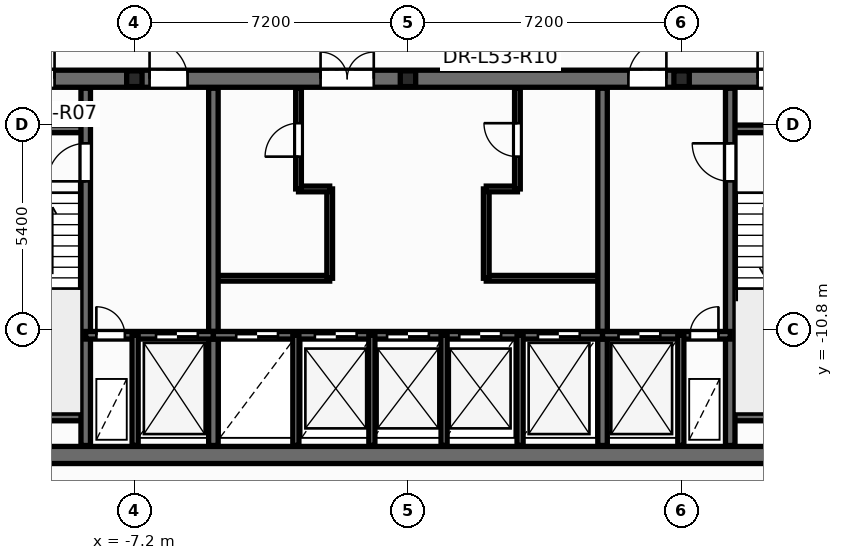
"""IFC4 building model, lengths in metres.
Left out: names, types, materials, properties, quantities, classifications, styles, units other than length and angle.
Written with IfcOpenShell. Run it as: python <this file> out.ifc"""

import sys

from ifc_helpers import new_model, si_unit, direction, frame, frame_2d, origin, origin_2d, place, context, subcontext, project, spatial, rectangle, i_section, extrude, element, fill, save


model = new_model("IFC4")
c1 = context("Model", 3, precision=1e-05, world=origin(), true_north=direction((0.0, 1.0)))
c2 = subcontext(c1, "Body", "Model", "MODEL_VIEW")
j1 = project(units=[si_unit("LENGTHUNIT", "METRE"), si_unit("PLANEANGLEUNIT", "RADIAN")], contexts=[c1])
p1 = place(None, origin())
s1 = spatial("IfcSite", under=j1, at=p1, CompositionType="ELEMENT")
p2 = place(p1, origin())
s2 = spatial("IfcBuilding", under=s1, at=p2, CompositionType="ELEMENT")
p3 = place(p2, frame((0.0, 0.0, 203.7)))
s3 = spatial("IfcBuildingStorey", under=s2, at=p3, CompositionType="ELEMENT", Elevation=203.7)
for number, where, z_axis, x_axis in (
    (1, (-7.2, -4.2, 0.0), (0.0, 0.0, 1.0), (1.0, 0.0, 0.0)),
    (2, (0.0, -4.2, 0.0), (0.0, 0.0, 1.0), (1.0, 0.0, 0.0)),
    (3, (7.2, -4.2, 0.0), (0.0, 0.0, 1.0), (1.0, 0.0, 0.0)),
):
    element("IfcColumn", number, at=place(p3, frame(where, z_axis=z_axis, x_axis=x_axis)), inside=s3, PredefinedType="PILASTER", context=c2, shape_type="SweptSolid", body=[
        extrude(i_section(OverallWidth=0.405, OverallDepth=0.414, WebThickness=0.022, FlangeThickness=0.032, at=origin_2d()), origin(), (0.0, 0.0, 1.0), 3.6),
    ])
p4 = place(p3, frame((-5.12, -9.45, 0.0), z_axis=(0.0, 0.0, 1.0), x_axis=(1.0, 0.0, 0.0)))
e4 = element("IfcWall", 4, at=p4, inside=s3, PredefinedType="PARTITIONING", context=c2, shape_type="SweptSolid", body=[
    extrude(rectangle(XDim=3.06, YDim=0.15, at=frame_2d((1.53, 0.0))), origin(), (0.0, 0.0, 1.0), 3.345),
])
p5 = place(p3, frame((-2.06, -9.45, 0.0), z_axis=(0.0, 0.0, 1.0), x_axis=(0.0, 1.0, 0.0)))
e5 = element("IfcWall", 5, at=p5, inside=s3, PredefinedType="PARTITIONING", context=c2, shape_type="SweptSolid", body=[
    extrude(rectangle(XDim=2.35, YDim=0.15, at=frame_2d((1.175, 0.0))), origin(), (0.0, 0.0, 1.0), 3.345),
])
p6 = place(p3, frame((-2.88, -7.1, 0.0), z_axis=(0.0, 0.0, 1.0), x_axis=(1.0, 0.0, 0.0)))
e6 = element("IfcWall", 6, at=p6, inside=s3, PredefinedType="PARTITIONING", context=c2, shape_type="SweptSolid", body=[
    extrude(rectangle(XDim=0.82, YDim=0.15, at=frame_2d((0.41, 0.0))), origin(), (0.0, 0.0, 1.0), 3.345),
])
p7 = place(p3, frame((-2.88, -7.1, 0.0), z_axis=(0.0, 0.0, 1.0), x_axis=(0.0, 1.0, 0.0)))
e7 = element("IfcWall", 7, at=p7, inside=s3, PredefinedType="PARTITIONING", context=c2, shape_type="SweptSolid", body=[
    extrude(rectangle(XDim=2.65, YDim=0.15, at=frame_2d((1.325, 0.0))), origin(), (0.0, 0.0, 1.0), 3.345),
])
p8 = place(p7, frame((0.85, 0.0, 0.0)))
e8 = element("IfcOpeningElement", 8, at=p8, cuts=e7, PredefinedType="OPENING", context=c2, shape_type="SweptSolid", body=[
    extrude(rectangle(XDim=0.886, YDim=2.104, at=frame_2d((0.44, 1.052))), frame((0.0, 0.085, 0.0), z_axis=(0.0, -1.0, 0.0), x_axis=(1.0, 0.0, 0.0)), (0.0, 0.0, 1.0), 0.17),
])
p9 = place(p3, frame((2.06, -9.45, 0.0), z_axis=(0.0, 0.0, 1.0), x_axis=(1.0, 0.0, 0.0)))
e9 = element("IfcWall", 9, at=p9, inside=s3, PredefinedType="PARTITIONING", context=c2, shape_type="SweptSolid", body=[
    extrude(rectangle(XDim=3.06, YDim=0.15, at=frame_2d((1.53, 0.0))), origin(), (0.0, 0.0, 1.0), 3.345),
])
p10 = place(p3, frame((2.06, -9.45, 0.0), z_axis=(0.0, 0.0, 1.0), x_axis=(0.0, 1.0, 0.0)))
e10 = element("IfcWall", 10, at=p10, inside=s3, PredefinedType="PARTITIONING", context=c2, shape_type="SweptSolid", body=[
    extrude(rectangle(XDim=2.35, YDim=0.15, at=frame_2d((1.175, 0.0))), origin(), (0.0, 0.0, 1.0), 3.345),
])
p11 = place(p3, frame((2.06, -7.1, 0.0), z_axis=(0.0, 0.0, 1.0), x_axis=(1.0, 0.0, 0.0)))
e11 = element("IfcWall", 11, at=p11, inside=s3, PredefinedType="PARTITIONING", context=c2, shape_type="SweptSolid", body=[
    extrude(rectangle(XDim=0.82, YDim=0.15, at=frame_2d((0.41, 0.0))), origin(), (0.0, 0.0, 1.0), 3.345),
])
p12 = place(p3, frame((2.88, -7.1, 0.0), z_axis=(0.0, 0.0, 1.0), x_axis=(0.0, 1.0, 0.0)))
e12 = element("IfcWall", 12, at=p12, inside=s3, PredefinedType="PARTITIONING", context=c2, shape_type="SweptSolid", body=[
    extrude(rectangle(XDim=2.65, YDim=0.15, at=frame_2d((1.325, 0.0))), origin(), (0.0, 0.0, 1.0), 3.345),
])
p13 = place(p12, frame((0.85, 0.0, 0.0)))
e13 = element("IfcOpeningElement", 13, at=p13, cuts=e12, PredefinedType="OPENING", context=c2, shape_type="SweptSolid", body=[
    extrude(rectangle(XDim=0.886, YDim=2.104, at=frame_2d((0.44, 1.052))), frame((0.0, 0.085, 0.0), z_axis=(0.0, -1.0, 0.0), x_axis=(1.0, 0.0, 0.0)), (0.0, 0.0, 1.0), 0.17),
])
p14 = place(p3, frame((-12.65, -14.1, 0.0), z_axis=(0.0, 0.0, 1.0), x_axis=(1.0, 0.0, 0.0)))
e14 = element("IfcWall", 14, at=p14, inside=s3, PredefinedType="SHEAR", context=c2, shape_type="SweptSolid", body=[
    extrude(rectangle(XDim=25.3, YDim=0.45, at=frame_2d((12.65, 0.0))), origin(), (0.0, 0.0, 1.0), 3.6),
])
p15 = place(p3, frame((-12.65, -4.2, 0.0), z_axis=(0.0, 0.0, 1.0), x_axis=(1.0, 0.0, 0.0)))
e15 = element("IfcWall", 15, at=p15, inside=s3, PredefinedType="SHEAR", context=c2, shape_type="SweptSolid", body=[
    extrude(rectangle(XDim=25.3, YDim=0.45, at=frame_2d((12.65, 0.0))), origin(), (0.0, 0.0, 1.0), 3.6),
])
p16 = place(p15, frame((0.95, 0.0, 0.0)))
e16 = element("IfcOpeningElement", 16, at=p16, cuts=e15, PredefinedType="OPENING", context=c2, shape_type="SweptSolid", body=[
    extrude(rectangle(XDim=0.756, YDim=2.054, at=frame_2d((0.375, 1.027))), frame((0.0, 0.235, 0.0), z_axis=(0.0, -1.0, 0.0), x_axis=(1.0, 0.0, 0.0)), (0.0, 0.0, 1.0), 0.47),
])
p17 = place(p15, frame((2.6, 0.0, 0.0)))
e17 = element("IfcOpeningElement", 17, at=p17, cuts=e15, PredefinedType="OPENING", context=c2, shape_type="SweptSolid", body=[
    extrude(rectangle(XDim=0.756, YDim=2.054, at=frame_2d((0.375, 1.027))), frame((0.0, 0.235, 0.0), z_axis=(0.0, -1.0, 0.0), x_axis=(1.0, 0.0, 0.0)), (0.0, 0.0, 1.0), 0.47),
])
p18 = place(p15, frame((21.85, 0.0, 0.0)))
e18 = element("IfcOpeningElement", 18, at=p18, cuts=e15, PredefinedType="OPENING", context=c2, shape_type="SweptSolid", body=[
    extrude(rectangle(XDim=0.756, YDim=2.054, at=frame_2d((0.375, 1.027))), frame((0.0, 0.235, 0.0), z_axis=(0.0, -1.0, 0.0), x_axis=(1.0, 0.0, 0.0)), (0.0, 0.0, 1.0), 0.47),
])
p19 = place(p15, frame((23.5, 0.0, 0.0)))
e19 = element("IfcOpeningElement", 19, at=p19, cuts=e15, PredefinedType="OPENING", context=c2, shape_type="SweptSolid", body=[
    extrude(rectangle(XDim=0.756, YDim=2.054, at=frame_2d((0.375, 1.027))), frame((0.0, 0.235, 0.0), z_axis=(0.0, -1.0, 0.0), x_axis=(1.0, 0.0, 0.0)), (0.0, 0.0, 1.0), 0.47),
])
p20 = place(p15, frame((5.85, 0.0, 0.0)))
e20 = element("IfcOpeningElement", 20, at=p20, cuts=e15, PredefinedType="OPENING", context=c2, shape_type="SweptSolid", body=[
    extrude(rectangle(XDim=1.006, YDim=2.104, at=frame_2d((0.5, 1.052))), frame((0.0, 0.235, 0.0), z_axis=(0.0, -1.0, 0.0), x_axis=(1.0, 0.0, 0.0)), (0.0, 0.0, 1.0), 0.47),
])
p21 = place(p15, frame((10.35, 0.0, 0.0)))
e21 = element("IfcOpeningElement", 21, at=p21, cuts=e15, PredefinedType="OPENING", context=c2, shape_type="SweptSolid", body=[
    extrude(rectangle(XDim=1.406, YDim=2.154, at=frame_2d((0.7, 1.077))), frame((0.0, 0.235, 0.0), z_axis=(0.0, -1.0, 0.0), x_axis=(1.0, 0.0, 0.0)), (0.0, 0.0, 1.0), 0.47),
])
p22 = place(p15, frame((18.45, 0.0, 0.0)))
e22 = element("IfcOpeningElement", 22, at=p22, cuts=e15, PredefinedType="OPENING", context=c2, shape_type="SweptSolid", body=[
    extrude(rectangle(XDim=1.006, YDim=2.104, at=frame_2d((0.5, 1.052))), frame((0.0, 0.235, 0.0), z_axis=(0.0, -1.0, 0.0), x_axis=(1.0, 0.0, 0.0)), (0.0, 0.0, 1.0), 0.47),
])
for number, where, z_axis, x_axis in (
    (23, (-12.35, -5.52, 0.0), (0.0, 0.0, 1.0), (1.0, 0.0, 0.0)),
    (24, (-12.35, -13.1, 0.0), (0.0, 0.0, 1.0), (1.0, 0.0, 0.0)),
    (25, (8.48, -5.52, 0.0), (0.0, 0.0, 1.0), (1.0, 0.0, 0.0)),
    (26, (8.48, -13.1, 0.0), (0.0, 0.0, 1.0), (1.0, 0.0, 0.0)),
):
    element("IfcWall", number, at=place(p3, frame(where, z_axis=z_axis, x_axis=x_axis)), inside=s3, PredefinedType="SOLIDWALL", context=c2, shape_type="SweptSolid", body=[
        extrude(rectangle(XDim=3.87, YDim=0.2, at=frame_2d((1.935, 0.0))), origin(), (0.0, 0.0, 1.0), 3.6),
    ])
p23 = place(p3, frame((-8.48, -13.85, 0.0), z_axis=(0.0, 0.0, 1.0), x_axis=(0.0, 1.0, 0.0)))
e27 = element("IfcWall", 27, at=p23, inside=s3, PredefinedType="SHEAR", context=c2, shape_type="SweptSolid", body=[
    extrude(rectangle(XDim=9.4, YDim=0.25, at=frame_2d((4.7, 0.0))), origin(), (0.0, 0.0, 1.0), 3.6),
])
p24 = place(p23, frame((6.95, 0.0, 0.0)))
e28 = element("IfcOpeningElement", 28, at=p24, cuts=e27, PredefinedType="OPENING", context=c2, shape_type="SweptSolid", body=[
    extrude(rectangle(XDim=1.006, YDim=2.104, at=frame_2d((0.5, 1.052))), frame((0.0, 0.135, 0.0), z_axis=(0.0, -1.0, 0.0), x_axis=(1.0, 0.0, 0.0)), (0.0, 0.0, 1.0), 0.27),
])
p25 = place(p3, frame((8.48, -13.85, 0.0), z_axis=(0.0, 0.0, 1.0), x_axis=(0.0, 1.0, 0.0)))
e29 = element("IfcWall", 29, at=p25, inside=s3, PredefinedType="SHEAR", context=c2, shape_type="SweptSolid", body=[
    extrude(rectangle(XDim=9.4, YDim=0.25, at=frame_2d((4.7, 0.0))), origin(), (0.0, 0.0, 1.0), 3.6),
])
p26 = place(p25, frame((6.95, 0.0, 0.0)))
e30 = element("IfcOpeningElement", 30, at=p26, cuts=e29, PredefinedType="OPENING", context=c2, shape_type="SweptSolid", body=[
    extrude(rectangle(XDim=1.006, YDim=2.104, at=frame_2d((0.5, 1.052))), frame((0.0, 0.135, 0.0), z_axis=(0.0, -1.0, 0.0), x_axis=(1.0, 0.0, 0.0)), (0.0, 0.0, 1.0), 0.27),
])
for number, where, z_axis, x_axis in (
    (31, (-5.12, -13.85, 0.0), (0.0, 0.0, 1.0), (0.0, 1.0, 0.0)),
    (32, (5.12, -13.85, 0.0), (0.0, 0.0, 1.0), (0.0, 1.0, 0.0)),
):
    element("IfcWall", number, at=place(p3, frame(where, z_axis=z_axis, x_axis=x_axis)), inside=s3, PredefinedType="SHEAR", context=c2, shape_type="SweptSolid", body=[
        extrude(rectangle(XDim=9.4, YDim=0.25, at=frame_2d((4.7, 0.0))), origin(), (0.0, 0.0, 1.0), 3.6),
    ])
p27 = place(p3, frame((-8.48, -10.95, 0.0), z_axis=(0.0, 0.0, 1.0), x_axis=(1.0, 0.0, 0.0)))
e33 = element("IfcWall", 33, at=p27, inside=s3, PredefinedType="SOLIDWALL", context=c2, shape_type="SweptSolid", body=[
    extrude(rectangle(XDim=3.36, YDim=0.2, at=frame_2d((1.68, 0.0))), origin(), (0.0, 0.0, 1.0), 3.6),
])
p28 = place(p27, frame((0.28, 0.0, 0.0)))
e34 = element("IfcOpeningElement", 34, at=p28, cuts=e33, PredefinedType="OPENING", context=c2, shape_type="SweptSolid", body=[
    extrude(rectangle(XDim=0.756, YDim=2.054, at=frame_2d((0.375, 1.027))), frame((0.0, 0.11, 0.0), z_axis=(0.0, -1.0, 0.0), x_axis=(1.0, 0.0, 0.0)), (0.0, 0.0, 1.0), 0.22),
])
p29 = place(p27, frame((1.85, 0.0, 0.0)))
e35 = element("IfcOpeningElement", 35, at=p29, cuts=e33, PredefinedType="OPENING", context=c2, shape_type="SweptSolid", body=[
    extrude(rectangle(XDim=1.106, YDim=2.104, at=frame_2d((0.55, 1.052))), frame((0.0, 0.11, 0.0), z_axis=(0.0, -1.0, 0.0), x_axis=(1.0, 0.0, 0.0)), (0.0, 0.0, 1.0), 0.22),
])
p30 = place(p3, frame((-5.12, -10.95, 0.0), z_axis=(0.0, 0.0, 1.0), x_axis=(1.0, 0.0, 0.0)))
e36 = element("IfcWall", 36, at=p30, inside=s3, PredefinedType="SOLIDWALL", context=c2, shape_type="SweptSolid", body=[
    extrude(rectangle(XDim=10.24, YDim=0.2, at=frame_2d((5.12, 0.0))), origin(), (0.0, 0.0, 1.0), 3.6),
])
p31 = place(p30, frame((0.6, 0.0, 0.0)))
e37 = element("IfcOpeningElement", 37, at=p31, cuts=e36, PredefinedType="OPENING", context=c2, shape_type="SweptSolid", body=[
    extrude(rectangle(XDim=1.106, YDim=2.104, at=frame_2d((0.55, 1.052))), frame((0.0, 0.11, 0.0), z_axis=(0.0, -1.0, 0.0), x_axis=(1.0, 0.0, 0.0)), (0.0, 0.0, 1.0), 0.22),
])
p32 = place(p30, frame((2.67, 0.0, 0.0)))
e38 = element("IfcOpeningElement", 38, at=p32, cuts=e36, PredefinedType="OPENING", context=c2, shape_type="SweptSolid", body=[
    extrude(rectangle(XDim=1.106, YDim=2.104, at=frame_2d((0.55, 1.052))), frame((0.0, 0.11, 0.0), z_axis=(0.0, -1.0, 0.0), x_axis=(1.0, 0.0, 0.0)), (0.0, 0.0, 1.0), 0.22),
])
p33 = place(p30, frame((4.57, 0.0, 0.0)))
e39 = element("IfcOpeningElement", 39, at=p33, cuts=e36, PredefinedType="OPENING", context=c2, shape_type="SweptSolid", body=[
    extrude(rectangle(XDim=1.106, YDim=2.104, at=frame_2d((0.55, 1.052))), frame((0.0, 0.11, 0.0), z_axis=(0.0, -1.0, 0.0), x_axis=(1.0, 0.0, 0.0)), (0.0, 0.0, 1.0), 0.22),
])
p34 = place(p30, frame((6.47, 0.0, 0.0)))
e40 = element("IfcOpeningElement", 40, at=p34, cuts=e36, PredefinedType="OPENING", context=c2, shape_type="SweptSolid", body=[
    extrude(rectangle(XDim=1.106, YDim=2.104, at=frame_2d((0.55, 1.052))), frame((0.0, 0.11, 0.0), z_axis=(0.0, -1.0, 0.0), x_axis=(1.0, 0.0, 0.0)), (0.0, 0.0, 1.0), 0.22),
])
p35 = place(p30, frame((8.54, 0.0, 0.0)))
e41 = element("IfcOpeningElement", 41, at=p35, cuts=e36, PredefinedType="OPENING", context=c2, shape_type="SweptSolid", body=[
    extrude(rectangle(XDim=1.106, YDim=2.104, at=frame_2d((0.55, 1.052))), frame((0.0, 0.11, 0.0), z_axis=(0.0, -1.0, 0.0), x_axis=(1.0, 0.0, 0.0)), (0.0, 0.0, 1.0), 0.22),
])
p36 = place(p3, frame((5.12, -10.95, 0.0), z_axis=(0.0, 0.0, 1.0), x_axis=(1.0, 0.0, 0.0)))
e42 = element("IfcWall", 42, at=p36, inside=s3, PredefinedType="SOLIDWALL", context=c2, shape_type="SweptSolid", body=[
    extrude(rectangle(XDim=3.36, YDim=0.2, at=frame_2d((1.68, 0.0))), origin(), (0.0, 0.0, 1.0), 3.6),
])
p37 = place(p36, frame((0.42, 0.0, 0.0)))
e43 = element("IfcOpeningElement", 43, at=p37, cuts=e42, PredefinedType="OPENING", context=c2, shape_type="SweptSolid", body=[
    extrude(rectangle(XDim=1.106, YDim=2.104, at=frame_2d((0.55, 1.052))), frame((0.0, 0.11, 0.0), z_axis=(0.0, -1.0, 0.0), x_axis=(1.0, 0.0, 0.0)), (0.0, 0.0, 1.0), 0.22),
])
p38 = place(p36, frame((2.3, 0.0, 0.0)))
e44 = element("IfcOpeningElement", 44, at=p38, cuts=e42, PredefinedType="OPENING", context=c2, shape_type="SweptSolid", body=[
    extrude(rectangle(XDim=0.756, YDim=2.054, at=frame_2d((0.375, 1.027))), frame((0.0, 0.11, 0.0), z_axis=(0.0, -1.0, 0.0), x_axis=(1.0, 0.0, 0.0)), (0.0, 0.0, 1.0), 0.22),
])
for number, where, z_axis, x_axis in (
    (45, (-7.18, -13.85, 0.0), (0.0, 0.0, 1.0), (0.0, 1.0, 0.0)),
    (46, (7.18, -13.85, 0.0), (0.0, 0.0, 1.0), (0.0, 1.0, 0.0)),
    (47, (-2.95, -13.85, 0.0), (0.0, 0.0, 1.0), (0.0, 1.0, 0.0)),
    (48, (2.95, -13.85, 0.0), (0.0, 0.0, 1.0), (0.0, 1.0, 0.0)),
    (49, (-0.95, -13.85, 0.0), (0.0, 0.0, 1.0), (0.0, 1.0, 0.0)),
    (50, (0.95, -13.85, 0.0), (0.0, 0.0, 1.0), (0.0, 1.0, 0.0)),
):
    element("IfcWall", number, at=place(p3, frame(where, z_axis=z_axis, x_axis=x_axis)), inside=s3, PredefinedType="PARTITIONING", context=c2, shape_type="SweptSolid", body=[
        extrude(rectangle(XDim=2.9, YDim=0.16, at=frame_2d((1.45, 0.0))), origin(), (0.0, 0.0, 1.0), 2.47),
    ])
p39 = place(p8, origin())
e51 = element("IfcDoor", 51, at=p39, inside=s3, OperationType="SINGLE_SWING_LEFT", PredefinedType="DOOR", context=c2, shape_type="SweptSolid", body=[
    extrude(rectangle(XDim=0.88, YDim=2.1, at=frame_2d((0.44, 1.05))), frame((0.0, 0.025, 0.0), z_axis=(0.0, -1.0, 0.0), x_axis=(1.0, 0.0, 0.0)), (0.0, 0.0, 1.0), 0.05),
])
fill(e8, e51)
p40 = place(p13, origin())
e52 = element("IfcDoor", 52, at=p40, inside=s3, OperationType="SINGLE_SWING_RIGHT", PredefinedType="DOOR", context=c2, shape_type="SweptSolid", body=[
    extrude(rectangle(XDim=0.88, YDim=2.1, at=frame_2d((0.44, 1.05))), frame((0.0, 0.025, 0.0), z_axis=(0.0, -1.0, 0.0), x_axis=(1.0, 0.0, 0.0)), (0.0, 0.0, 1.0), 0.05),
])
fill(e13, e52)
p41 = place(p24, origin())
e53 = element("IfcDoor", 53, at=p41, inside=s3, OperationType="SINGLE_SWING_LEFT", PredefinedType="DOOR", context=c2, shape_type="SweptSolid", body=[
    extrude(rectangle(XDim=1.0, YDim=2.1, at=frame_2d((0.5, 1.05))), frame((0.0, 0.025, 0.0), z_axis=(0.0, -1.0, 0.0), x_axis=(1.0, 0.0, 0.0)), (0.0, 0.0, 1.0), 0.05),
])
fill(e28, e53)
p42 = place(p26, origin())
e54 = element("IfcDoor", 54, at=p42, inside=s3, OperationType="SINGLE_SWING_RIGHT", PredefinedType="DOOR", context=c2, shape_type="SweptSolid", body=[
    extrude(rectangle(XDim=1.0, YDim=2.1, at=frame_2d((0.5, 1.05))), frame((0.0, 0.025, 0.0), z_axis=(0.0, -1.0, 0.0), x_axis=(1.0, 0.0, 0.0)), (0.0, 0.0, 1.0), 0.05),
])
fill(e30, e54)
p43 = place(p28, origin())
e55 = element("IfcDoor", 55, at=p43, inside=s3, OperationType="SINGLE_SWING_LEFT", PredefinedType="DOOR", context=c2, shape_type="SweptSolid", body=[
    extrude(rectangle(XDim=0.75, YDim=2.05, at=frame_2d((0.375, 1.025))), frame((0.0, 0.025, 0.0), z_axis=(0.0, -1.0, 0.0), x_axis=(1.0, 0.0, 0.0)), (0.0, 0.0, 1.0), 0.05),
])
fill(e34, e55)
p44 = place(p29, origin())
e56 = element("IfcDoor", 56, at=p44, inside=s3, OperationType="DOUBLE_DOOR_SLIDING", PredefinedType="DOOR", context=c2, shape_type="SweptSolid", body=[
    extrude(rectangle(XDim=1.1, YDim=2.1, at=frame_2d((0.55, 1.05))), frame((0.0, 0.025, 0.0), z_axis=(0.0, -1.0, 0.0), x_axis=(1.0, 0.0, 0.0)), (0.0, 0.0, 1.0), 0.05),
])
fill(e35, e56)
p45 = place(p37, origin())
e57 = element("IfcDoor", 57, at=p45, inside=s3, OperationType="DOUBLE_DOOR_SLIDING", PredefinedType="DOOR", context=c2, shape_type="SweptSolid", body=[
    extrude(rectangle(XDim=1.1, YDim=2.1, at=frame_2d((0.55, 1.05))), frame((0.0, 0.025, 0.0), z_axis=(0.0, -1.0, 0.0), x_axis=(1.0, 0.0, 0.0)), (0.0, 0.0, 1.0), 0.05),
])
fill(e43, e57)
p46 = place(p38, origin())
e58 = element("IfcDoor", 58, at=p46, inside=s3, OperationType="SINGLE_SWING_RIGHT", PredefinedType="DOOR", context=c2, shape_type="SweptSolid", body=[
    extrude(rectangle(XDim=0.75, YDim=2.05, at=frame_2d((0.375, 1.025))), frame((0.0, 0.025, 0.0), z_axis=(0.0, -1.0, 0.0), x_axis=(1.0, 0.0, 0.0)), (0.0, 0.0, 1.0), 0.05),
])
fill(e44, e58)
p47 = place(p31, origin())
e59 = element("IfcDoor", 59, at=p47, inside=s3, OperationType="DOUBLE_DOOR_SLIDING", PredefinedType="DOOR", context=c2, shape_type="SweptSolid", body=[
    extrude(rectangle(XDim=1.1, YDim=2.1, at=frame_2d((0.55, 1.05))), frame((0.0, 0.025, 0.0), z_axis=(0.0, -1.0, 0.0), x_axis=(1.0, 0.0, 0.0)), (0.0, 0.0, 1.0), 0.05),
])
fill(e37, e59)
p48 = place(p32, origin())
e60 = element("IfcDoor", 60, at=p48, inside=s3, OperationType="DOUBLE_DOOR_SLIDING", PredefinedType="DOOR", context=c2, shape_type="SweptSolid", body=[
    extrude(rectangle(XDim=1.1, YDim=2.1, at=frame_2d((0.55, 1.05))), frame((0.0, 0.025, 0.0), z_axis=(0.0, -1.0, 0.0), x_axis=(1.0, 0.0, 0.0)), (0.0, 0.0, 1.0), 0.05),
])
fill(e38, e60)
p49 = place(p33, origin())
e61 = element("IfcDoor", 61, at=p49, inside=s3, OperationType="DOUBLE_DOOR_SLIDING", PredefinedType="DOOR", context=c2, shape_type="SweptSolid", body=[
    extrude(rectangle(XDim=1.1, YDim=2.1, at=frame_2d((0.55, 1.05))), frame((0.0, 0.025, 0.0), z_axis=(0.0, -1.0, 0.0), x_axis=(1.0, 0.0, 0.0)), (0.0, 0.0, 1.0), 0.05),
])
fill(e39, e61)
p50 = place(p34, origin())
e62 = element("IfcDoor", 62, at=p50, inside=s3, OperationType="DOUBLE_DOOR_SLIDING", PredefinedType="DOOR", context=c2, shape_type="SweptSolid", body=[
    extrude(rectangle(XDim=1.1, YDim=2.1, at=frame_2d((0.55, 1.05))), frame((0.0, 0.025, 0.0), z_axis=(0.0, -1.0, 0.0), x_axis=(1.0, 0.0, 0.0)), (0.0, 0.0, 1.0), 0.05),
])
fill(e40, e62)
p51 = place(p35, origin())
e63 = element("IfcDoor", 63, at=p51, inside=s3, OperationType="DOUBLE_DOOR_SLIDING", PredefinedType="DOOR", context=c2, shape_type="SweptSolid", body=[
    extrude(rectangle(XDim=1.1, YDim=2.1, at=frame_2d((0.55, 1.05))), frame((0.0, 0.025, 0.0), z_axis=(0.0, -1.0, 0.0), x_axis=(1.0, 0.0, 0.0)), (0.0, 0.0, 1.0), 0.05),
])
fill(e41, e63)
p52 = place(p17, origin())
e64 = element("IfcDoor", 64, at=p52, inside=s3, OperationType="SINGLE_SWING_RIGHT", PredefinedType="DOOR", context=c2, shape_type="SweptSolid", body=[
    extrude(rectangle(XDim=0.75, YDim=2.05, at=frame_2d((0.375, 1.025))), frame((0.0, 0.025, 0.0), z_axis=(0.0, -1.0, 0.0), x_axis=(1.0, 0.0, 0.0)), (0.0, 0.0, 1.0), 0.05),
])
fill(e17, e64)
p53 = place(p18, origin())
e65 = element("IfcDoor", 65, at=p53, inside=s3, OperationType="SINGLE_SWING_LEFT", PredefinedType="DOOR", context=c2, shape_type="SweptSolid", body=[
    extrude(rectangle(XDim=0.75, YDim=2.05, at=frame_2d((0.375, 1.025))), frame((0.0, 0.025, 0.0), z_axis=(0.0, -1.0, 0.0), x_axis=(1.0, 0.0, 0.0)), (0.0, 0.0, 1.0), 0.05),
])
fill(e18, e65)
p54 = place(p20, origin())
e66 = element("IfcDoor", 66, at=p54, inside=s3, OperationType="SINGLE_SWING_LEFT", PredefinedType="DOOR", context=c2, shape_type="SweptSolid", body=[
    extrude(rectangle(XDim=1.0, YDim=2.1, at=frame_2d((0.5, 1.05))), frame((0.0, 0.025, 0.0), z_axis=(0.0, -1.0, 0.0), x_axis=(1.0, 0.0, 0.0)), (0.0, 0.0, 1.0), 0.05),
])
fill(e20, e66)
p55 = place(p21, origin())
e67 = element("IfcDoor", 67, at=p55, inside=s3, OperationType="DOUBLE_DOOR_SINGLE_SWING", PredefinedType="DOOR", context=c2, shape_type="SweptSolid", body=[
    extrude(rectangle(XDim=1.4, YDim=2.15, at=frame_2d((0.7, 1.075))), frame((0.0, 0.025, 0.0), z_axis=(0.0, -1.0, 0.0), x_axis=(1.0, 0.0, 0.0)), (0.0, 0.0, 1.0), 0.05),
])
fill(e21, e67)
p56 = place(p22, origin())
e68 = element("IfcDoor", 68, at=p56, inside=s3, OperationType="SINGLE_SWING_RIGHT", PredefinedType="DOOR", context=c2, shape_type="SweptSolid", body=[
    extrude(rectangle(XDim=1.0, YDim=2.1, at=frame_2d((0.5, 1.05))), frame((0.0, 0.025, 0.0), z_axis=(0.0, -1.0, 0.0), x_axis=(1.0, 0.0, 0.0)), (0.0, 0.0, 1.0), 0.05),
])
fill(e22, e68)
save(model, sys.argv[1])
